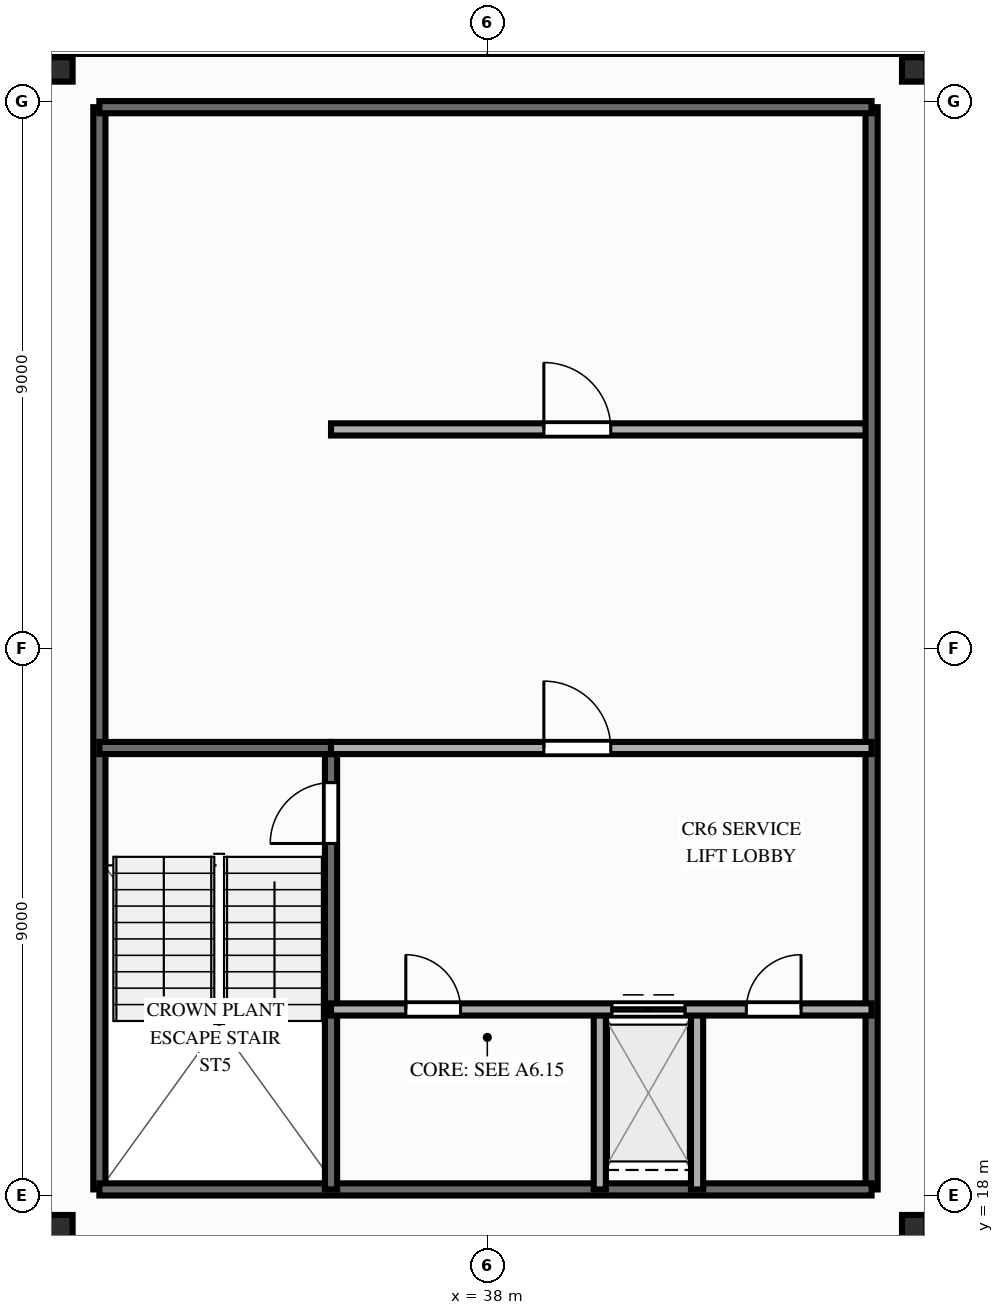
"""IFC4 building model, lengths in metres.
Left out: names, types, materials, properties, quantities, classifications, styles, units other than length and angle.
Written with IfcOpenShell. Run it as: python <this file> out.ifc"""

import sys

from ifc_helpers import new_model, si_unit, direction, frame, frame_2d, origin, origin_2d, place, context, subcontext, project, spatial, rectangle, i_section, extrude, source, transform, mapped, element, fill, save


model = new_model("IFC4")
c1 = context("Model", 3, precision=1e-05, world=origin(), true_north=direction((0.0, 1.0)))
c2 = subcontext(c1, "Body", "Model", "MODEL_VIEW")
j1 = project(units=[si_unit("LENGTHUNIT", "METRE"), si_unit("PLANEANGLEUNIT", "RADIAN")], contexts=[c1])
p1 = place(None, origin())
s1 = spatial("IfcSite", under=j1, at=p1, CompositionType="ELEMENT")
p2 = place(p1, origin())
s2 = spatial("IfcBuilding", under=s1, at=p2, CompositionType="ELEMENT")
p3 = place(p2, frame((0.0, 0.0, 271.2)))
s3 = spatial("IfcBuildingStorey", under=s2, at=p3, CompositionType="ELEMENT", Elevation=271.2)
m1 = source(origin(), c2, "Body", "SweptSolid", [
    extrude(i_section(OverallWidth=0.4, OverallDepth=0.4, WebThickness=0.013, FlangeThickness=0.021, at=origin_2d()), origin(), (0.0, 0.0, 1.0), 3.57),
])
for number, where, z_axis, x_axis in (
    (1, (30.98, 17.48, 0.0), (0.0, 0.0, 1.0), (1.0, 0.0, 0.0)),
    (2, (45.02, 17.48, 0.0), (0.0, 0.0, 1.0), (1.0, 0.0, 0.0)),
    (3, (30.98, 36.52, 0.0), (0.0, 0.0, 1.0), (1.0, 0.0, 0.0)),
    (4, (45.02, 36.52, 0.0), (0.0, 0.0, 1.0), (1.0, 0.0, 0.0)),
):
    element("IfcColumn", number, at=place(p3, frame(where, z_axis=z_axis, x_axis=x_axis)), inside=s3, PredefinedType="COLUMN", context=c2, shape_type="MappedRepresentation", body=[
        mapped(m1, transform((0.0, 0.0, 0.0), scale=1.0)),
    ])
p4 = place(p3, frame((35.43, 30.6, 0.0), z_axis=(0.0, 0.0, 1.0), x_axis=(1.0, 0.0, 0.0)))
e5 = element("IfcWall", 5, at=p4, inside=s3, PredefinedType="PARTITIONING", context=c2, shape_type="SweptSolid", body=[
    extrude(rectangle(XDim=8.89, YDim=0.2, at=frame_2d((4.445, 0.0))), origin(), (0.0, 0.0, 1.0), 3.56),
])
p5 = place(p4, frame((3.5, 0.0, 0.0)))
e6 = element("IfcOpeningElement", 6, at=p5, cuts=e5, PredefinedType="OPENING", context=c2, shape_type="SweptSolid", body=[
    extrude(rectangle(XDim=1.1, YDim=2.15, at=frame_2d((0.55, 1.075))), frame((0.0, 0.112, 0.0), z_axis=(0.0, -1.0, 0.0), x_axis=(1.0, 0.0, 0.0)), (0.0, 0.0, 1.0), 0.224),
])
for number, where, z_axis, x_axis in (
    (7, (31.62, 18.1, 0.0), (0.0, 0.0, 1.0), (0.0, 1.0, 0.0)),
    (8, (44.32, 18.1, 0.0), (0.0, 0.0, 1.0), (0.0, 1.0, 0.0)),
):
    element("IfcWall", number, at=place(p3, frame(where, z_axis=z_axis, x_axis=x_axis)), inside=s3, PredefinedType="SOLIDWALL", context=c2, shape_type="SweptSolid", body=[
        extrude(rectangle(XDim=17.8, YDim=0.2, at=frame_2d((8.9, 0.0))), origin(), (0.0, 0.0, 1.0), 3.57),
    ])
for number, where, z_axis, x_axis in (
    (9, (31.62, 18.1, 0.0), (0.0, 0.0, 1.0), (1.0, 0.0, 0.0)),
    (10, (31.62, 35.9, 0.0), (0.0, 0.0, 1.0), (1.0, 0.0, 0.0)),
):
    element("IfcWall", number, at=place(p3, frame(where, z_axis=z_axis, x_axis=x_axis)), inside=s3, PredefinedType="SOLIDWALL", context=c2, shape_type="SweptSolid", body=[
        extrude(rectangle(XDim=12.7, YDim=0.2, at=frame_2d((6.35, 0.0))), origin(), (0.0, 0.0, 1.0), 3.57),
    ])
p6 = place(p3, frame((35.43, 18.1, 0.0), z_axis=(0.0, 0.0, 1.0), x_axis=(0.0, 1.0, 0.0)))
e11 = element("IfcWall", 11, at=p6, inside=s3, PredefinedType="SOLIDWALL", context=c2, shape_type="SweptSolid", body=[
    extrude(rectangle(XDim=7.26, YDim=0.2, at=frame_2d((3.63, 0.0))), origin(), (0.0, 0.0, 1.0), 3.57),
])
p7 = place(p6, frame((6.69, 0.0, 0.0), z_axis=(0.0, 0.0, 1.0), x_axis=(-1.0, 0.0, 0.0)))
e12 = element("IfcOpeningElement", 12, at=p7, cuts=e11, PredefinedType="OPENING", context=c2, shape_type="SweptSolid", body=[
    extrude(rectangle(XDim=1.0, YDim=2.15, at=frame_2d((0.5, 1.075))), frame((0.0, 0.112, 0.0), z_axis=(0.0, -1.0, 0.0), x_axis=(1.0, 0.0, 0.0)), (0.0, 0.0, 1.0), 0.224),
])
p8 = place(p3, frame((31.62, 25.36, 0.0), z_axis=(0.0, 0.0, 1.0), x_axis=(1.0, 0.0, 0.0)))
e13 = element("IfcWall", 13, at=p8, inside=s3, PredefinedType="SOLIDWALL", context=c2, shape_type="SweptSolid", body=[
    extrude(rectangle(XDim=3.81, YDim=0.2, at=frame_2d((1.905, 0.0))), origin(), (0.0, 0.0, 1.0), 3.57),
])
for number, where, z_axis, x_axis in (
    (14, (39.85, 18.1, 0.0), (0.0, 0.0, 1.0), (0.0, 1.0, 0.0)),
    (15, (41.45, 18.1, 0.0), (0.0, 0.0, 1.0), (0.0, 1.0, 0.0)),
):
    element("IfcWall", number, at=place(p3, frame(where, z_axis=z_axis, x_axis=x_axis)), inside=s3, PredefinedType="PARTITIONING", context=c2, shape_type="SweptSolid", body=[
        extrude(rectangle(XDim=2.96, YDim=0.2, at=frame_2d((1.48, 0.0))), origin(), (0.0, 0.0, 1.0), 3.56),
    ])
p9 = place(p3, frame((35.43, 21.06, 0.0), z_axis=(0.0, 0.0, 1.0), x_axis=(1.0, 0.0, 0.0)))
e16 = element("IfcWall", 16, at=p9, inside=s3, PredefinedType="PARTITIONING", context=c2, shape_type="SweptSolid", body=[
    extrude(rectangle(XDim=8.89, YDim=0.2, at=frame_2d((4.445, 0.0))), origin(), (0.0, 0.0, 1.0), 3.56),
])
p10 = place(p9, frame((1.23, 0.0, 0.0)))
e17 = element("IfcOpeningElement", 17, at=p10, cuts=e16, PredefinedType="OPENING", context=c2, shape_type="SweptSolid", body=[
    extrude(rectangle(XDim=0.9, YDim=2.1, at=frame_2d((0.45, 1.05))), frame((0.0, 0.112, 0.0), z_axis=(0.0, -1.0, 0.0), x_axis=(1.0, 0.0, 0.0)), (0.0, 0.0, 1.0), 0.224),
])
p11 = place(p9, frame((4.62, 0.0, 0.0)))
e18 = element("IfcOpeningElement", 18, at=p11, cuts=e16, PredefinedType="OPENING", context=c2, shape_type="SweptSolid", body=[
    extrude(rectangle(XDim=1.2, YDim=2.15, at=frame_2d((0.6, 1.075))), frame((0.0, 0.112, 0.0), z_axis=(0.0, -1.0, 0.0), x_axis=(1.0, 0.0, 0.0)), (0.0, 0.0, 1.0), 0.224),
])
p12 = place(p9, frame((6.83, 0.0, 0.0)))
e19 = element("IfcOpeningElement", 19, at=p12, cuts=e16, PredefinedType="OPENING", context=c2, shape_type="SweptSolid", body=[
    extrude(rectangle(XDim=0.9, YDim=2.1, at=frame_2d((0.45, 1.05))), frame((0.0, 0.112, 0.0), z_axis=(0.0, -1.0, 0.0), x_axis=(1.0, 0.0, 0.0)), (0.0, 0.0, 1.0), 0.224),
])
p13 = place(p3, frame((35.43, 25.36, 0.0), z_axis=(0.0, 0.0, 1.0), x_axis=(1.0, 0.0, 0.0)))
e20 = element("IfcWall", 20, at=p13, inside=s3, PredefinedType="PARTITIONING", context=c2, shape_type="SweptSolid", body=[
    extrude(rectangle(XDim=8.89, YDim=0.2, at=frame_2d((4.445, 0.0))), origin(), (0.0, 0.0, 1.0), 2.972),
])
p14 = place(p13, frame((3.5, 0.0, 0.0)))
e21 = element("IfcOpeningElement", 21, at=p14, cuts=e20, PredefinedType="OPENING", context=c2, shape_type="SweptSolid", body=[
    extrude(rectangle(XDim=1.1, YDim=2.15, at=frame_2d((0.55, 1.075))), frame((0.0, 0.112, 0.0), z_axis=(0.0, -1.0, 0.0), x_axis=(1.0, 0.0, 0.0)), (0.0, 0.0, 1.0), 0.224),
])
m2 = source(origin(), c2, "Body", "SweptSolid", [
    extrude(rectangle(XDim=1.1, YDim=2.15, at=frame_2d((0.55, 1.075))), frame((0.0, 0.025, 0.0), z_axis=(0.0, -1.0, 0.0), x_axis=(1.0, 0.0, 0.0)), (0.0, 0.0, 1.0), 0.05),
])
p15 = place(p5, origin())
e22 = element("IfcDoor", 22, at=p15, inside=s3, OperationType="SINGLE_SWING_LEFT", PredefinedType="DOOR", context=c2, shape_type="MappedRepresentation", body=[
    mapped(m2, transform((0.0, 0.0, 0.0), scale=1.0)),
])
fill(e6, e22)
m3 = source(origin(), c2, "Body", "SweptSolid", [
    extrude(rectangle(XDim=1.0, YDim=2.15, at=frame_2d((0.5, 1.075))), frame((0.0, 0.025, 0.0), z_axis=(0.0, -1.0, 0.0), x_axis=(1.0, 0.0, 0.0)), (0.0, 0.0, 1.0), 0.05),
])
p16 = place(p7, origin())
e23 = element("IfcDoor", 23, at=p16, inside=s3, OperationType="SINGLE_SWING_RIGHT", PredefinedType="DOOR", context=c2, shape_type="MappedRepresentation", body=[
    mapped(m3, transform((0.0, 0.0, 0.0), scale=1.0)),
])
fill(e12, e23)
m4 = source(origin(), c2, "Body", "SweptSolid", [
    extrude(rectangle(XDim=0.9, YDim=2.1, at=frame_2d((0.45, 1.05))), frame((0.0, 0.025, 0.0), z_axis=(0.0, -1.0, 0.0), x_axis=(1.0, 0.0, 0.0)), (0.0, 0.0, 1.0), 0.05),
])
p17 = place(p10, origin())
e24 = element("IfcDoor", 24, at=p17, inside=s3, OperationType="SINGLE_SWING_LEFT", PredefinedType="DOOR", context=c2, shape_type="MappedRepresentation", body=[
    mapped(m4, transform((0.0, 0.0, 0.0), scale=1.0)),
])
fill(e17, e24)
m5 = source(origin(), c2, "Body", "SweptSolid", [
    extrude(rectangle(XDim=1.2, YDim=2.15, at=frame_2d((0.6, 1.075))), frame((0.0, 0.025, 0.0), z_axis=(0.0, -1.0, 0.0), x_axis=(1.0, 0.0, 0.0)), (0.0, 0.0, 1.0), 0.05),
])
p18 = place(p11, origin())
e25 = element("IfcDoor", 25, at=p18, inside=s3, OperationType="DOUBLE_DOOR_SLIDING", PredefinedType="DOOR", context=c2, shape_type="MappedRepresentation", body=[
    mapped(m5, transform((0.0, 0.0, 0.0), scale=1.0)),
])
fill(e18, e25)
p19 = place(p12, origin())
e26 = element("IfcDoor", 26, at=p19, inside=s3, OperationType="SINGLE_SWING_RIGHT", PredefinedType="DOOR", context=c2, shape_type="MappedRepresentation", body=[
    mapped(m4, transform((0.0, 0.0, 0.0), scale=1.0)),
])
fill(e19, e26)
p20 = place(p14, origin())
e27 = element("IfcDoor", 27, at=p20, inside=s3, OperationType="SINGLE_SWING_LEFT", PredefinedType="DOOR", context=c2, shape_type="MappedRepresentation", body=[
    mapped(m2, transform((0.0, 0.0, 0.0), scale=1.0)),
])
fill(e21, e27)
save(model, sys.argv[1])
